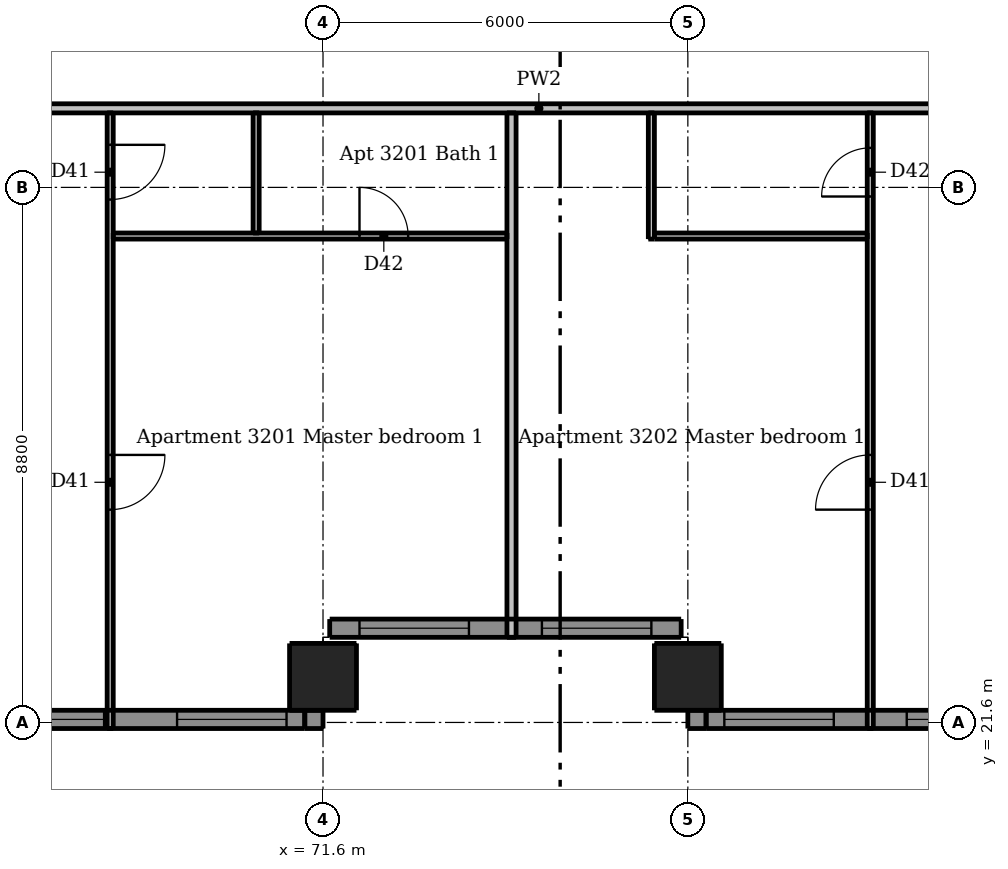
"""IFC4 building model, lengths in metres.
Left out: names, types, materials, properties, quantities, classifications, styles, units other than length and angle.
Written with IfcOpenShell. Run it as: python <this file> out.ifc"""

import sys

from ifc_helpers import new_model, si_unit, direction, frame, frame_2d, origin, origin_2d, place, context, subcontext, project, spatial, rectangle, extrude, element, fill, save


model = new_model("IFC4")
c1 = context("Model", 3, precision=1e-05, world=origin(), true_north=direction((0.0, 1.0)))
c2 = subcontext(c1, "Body", "Model", "MODEL_VIEW")
j1 = project(units=[si_unit("LENGTHUNIT", "METRE"), si_unit("PLANEANGLEUNIT", "RADIAN")], contexts=[c1])
p1 = place(None, origin())
s1 = spatial("IfcSite", under=j1, at=p1, CompositionType="ELEMENT")
p2 = place(p1, origin())
s2 = spatial("IfcBuilding", under=s1, at=p2, CompositionType="ELEMENT")
p3 = place(p2, frame((0.0, 0.0, 118.3)))
s3 = spatial("IfcBuildingStorey", under=s2, at=p3, CompositionType="ELEMENT", Elevation=118.3)
for number, where, z_axis, x_axis in (
    (1, (71.6, 22.35, 0.0), (0.0, 0.0, 1.0), (1.0, 0.0, 0.0)),
    (2, (77.6, 22.35, 0.0), (0.0, 0.0, 1.0), (1.0, 0.0, 0.0)),
):
    element("IfcColumn", number, at=place(p3, frame(where, z_axis=z_axis, x_axis=x_axis)), inside=s3, PredefinedType="COLUMN", context=c2, shape_type="SweptSolid", body=[
        extrude(rectangle(XDim=1.1, YDim=1.1, at=origin_2d()), origin(), (0.0, 0.0, 1.0), 3.05),
    ])
for number, where, z_axis, x_axis in (
    (3, (71.45, 21.5, 0.0), (0.0, 0.0, 1.0), (0.0, 1.0, 0.0)),
    (4, (77.75, 21.8, 0.0), (0.0, 0.0, 1.0), (0.0, -1.0, 0.0)),
):
    element("IfcWall", number, at=place(p3, frame(where, z_axis=z_axis, x_axis=x_axis)), inside=s3, PredefinedType="SOLIDWALL", context=c2, shape_type="SweptSolid", body=[
        extrude(rectangle(XDim=0.3, YDim=0.3, at=frame_2d((0.15, 0.0))), origin(), (0.0, 0.0, 1.0), 3.05),
    ])
p4 = place(p3, frame((65.6, 21.65, 0.0), z_axis=(0.0, 0.0, 1.0), x_axis=(1.0, 0.0, 0.0)))
e5 = element("IfcWall", 5, at=p4, inside=s3, PredefinedType="SOLIDWALL", context=c2, shape_type="SweptSolid", body=[
    extrude(rectangle(XDim=5.7, YDim=0.3, at=frame_2d((2.85, 0.0))), origin(), (0.0, 0.0, 1.0), 3.05),
])
p5 = place(p4, frame((0.6, 0.0, 0.15)))
e6 = element("IfcOpeningElement", 6, at=p5, cuts=e5, PredefinedType="OPENING", context=c2, shape_type="SweptSolid", body=[
    extrude(rectangle(XDim=1.8, YDim=2.1, at=frame_2d((0.9, 1.05))), frame((0.0, 0.16, 0.0), z_axis=(0.0, -1.0, 0.0), x_axis=(1.0, 0.0, 0.0)), (0.0, 0.0, 1.0), 0.32),
])
p6 = place(p4, frame((3.6, 0.0, 0.15)))
e7 = element("IfcOpeningElement", 7, at=p6, cuts=e5, PredefinedType="OPENING", context=c2, shape_type="SweptSolid", body=[
    extrude(rectangle(XDim=1.8, YDim=2.1, at=frame_2d((0.9, 1.05))), frame((0.0, 0.16, 0.0), z_axis=(0.0, -1.0, 0.0), x_axis=(1.0, 0.0, 0.0)), (0.0, 0.0, 1.0), 0.32),
])
p7 = place(p3, frame((71.71, 23.15, 0.0), z_axis=(0.0, 0.0, 1.0), x_axis=(1.0, 0.0, 0.0)))
e8 = element("IfcWall", 8, at=p7, inside=s3, PredefinedType="SOLIDWALL", context=c2, shape_type="SweptSolid", body=[
    extrude(rectangle(XDim=5.78, YDim=0.3, at=frame_2d((2.89, 0.0))), origin(), (0.0, 0.0, 1.0), 3.05),
])
p8 = place(p7, frame((0.49, 0.0, 0.15)))
e9 = element("IfcOpeningElement", 9, at=p8, cuts=e8, PredefinedType="OPENING", context=c2, shape_type="SweptSolid", body=[
    extrude(rectangle(XDim=1.8, YDim=2.1, at=frame_2d((0.9, 1.05))), frame((0.0, 0.16, 0.0), z_axis=(0.0, -1.0, 0.0), x_axis=(1.0, 0.0, 0.0)), (0.0, 0.0, 1.0), 0.32),
])
p9 = place(p7, frame((3.49, 0.0, 0.15)))
e10 = element("IfcOpeningElement", 10, at=p9, cuts=e8, PredefinedType="OPENING", context=c2, shape_type="SweptSolid", body=[
    extrude(rectangle(XDim=1.8, YDim=2.1, at=frame_2d((0.9, 1.05))), frame((0.0, 0.16, 0.0), z_axis=(0.0, -1.0, 0.0), x_axis=(1.0, 0.0, 0.0)), (0.0, 0.0, 1.0), 0.32),
])
p10 = place(p3, frame((77.9, 21.65, 0.0), z_axis=(0.0, 0.0, 1.0), x_axis=(1.0, 0.0, 0.0)))
e11 = element("IfcWall", 11, at=p10, inside=s3, PredefinedType="SOLIDWALL", context=c2, shape_type="SweptSolid", body=[
    extrude(rectangle(XDim=5.4, YDim=0.3, at=frame_2d((2.7, 0.0))), origin(), (0.0, 0.0, 1.0), 3.05),
])
p11 = place(p10, frame((0.3, 0.0, 0.15)))
e12 = element("IfcOpeningElement", 12, at=p11, cuts=e11, PredefinedType="OPENING", context=c2, shape_type="SweptSolid", body=[
    extrude(rectangle(XDim=1.8, YDim=2.1, at=frame_2d((0.9, 1.05))), frame((0.0, 0.16, 0.0), z_axis=(0.0, -1.0, 0.0), x_axis=(1.0, 0.0, 0.0)), (0.0, 0.0, 1.0), 0.32),
])
p12 = place(p10, frame((3.3, 0.0, 0.15)))
e13 = element("IfcOpeningElement", 13, at=p12, cuts=e11, PredefinedType="OPENING", context=c2, shape_type="SweptSolid", body=[
    extrude(rectangle(XDim=1.8, YDim=2.1, at=frame_2d((0.9, 1.05))), frame((0.0, 0.16, 0.0), z_axis=(0.0, -1.0, 0.0), x_axis=(1.0, 0.0, 0.0)), (0.0, 0.0, 1.0), 0.32),
])
p13 = place(p3, frame((68.1, 31.625, 0.0), z_axis=(0.0, 0.0, 1.0), x_axis=(0.0, -1.0, 0.0)))
e14 = element("IfcWall", 14, at=p13, inside=s3, PredefinedType="PARTITIONING", context=c2, shape_type="SweptSolid", body=[
    extrude(rectangle(XDim=10.125, YDim=0.1, at=frame_2d((5.062, 0.0))), origin(), (0.0, 0.0, 1.0), 3.05),
])
p14 = place(p13, frame((0.525, 0.0, 0.0)))
e15 = element("IfcOpeningElement", 15, at=p14, cuts=e14, PredefinedType="OPENING", context=c2, shape_type="SweptSolid", body=[
    extrude(rectangle(XDim=0.9, YDim=2.1, at=frame_2d((0.45, 1.05))), frame((0.0, 0.06, 0.0), z_axis=(0.0, -1.0, 0.0), x_axis=(1.0, 0.0, 0.0)), (0.0, 0.0, 1.0), 0.12),
])
p15 = place(p13, frame((5.625, 0.0, 0.0)))
e16 = element("IfcOpeningElement", 16, at=p15, cuts=e14, PredefinedType="OPENING", context=c2, shape_type="SweptSolid", body=[
    extrude(rectangle(XDim=0.9, YDim=2.1, at=frame_2d((0.45, 1.05))), frame((0.0, 0.06, 0.0), z_axis=(0.0, -1.0, 0.0), x_axis=(1.0, 0.0, 0.0)), (0.0, 0.0, 1.0), 0.12),
])
p16 = place(p3, frame((70.5, 29.65, 0.0), z_axis=(0.0, 0.0, 1.0), x_axis=(0.0, 1.0, 0.0)))
e17 = element("IfcWall", 17, at=p16, inside=s3, PredefinedType="PARTITIONING", context=c2, shape_type="SweptSolid", body=[
    extrude(rectangle(XDim=1.975, YDim=0.1, at=frame_2d((0.988, 0.0))), origin(), (0.0, 0.0, 1.0), 3.05),
])
p17 = place(p3, frame((77.0, 29.55, 0.0), z_axis=(0.0, 0.0, 1.0), x_axis=(0.0, 1.0, 0.0)))
e18 = element("IfcWall", 18, at=p17, inside=s3, PredefinedType="PARTITIONING", context=c2, shape_type="SweptSolid", body=[
    extrude(rectangle(XDim=2.075, YDim=0.1, at=frame_2d((1.038, 0.0))), origin(), (0.0, 0.0, 1.0), 3.05),
])
p18 = place(p3, frame((80.6, 21.5, 0.0), z_axis=(0.0, 0.0, 1.0), x_axis=(0.0, 1.0, 0.0)))
e19 = element("IfcWall", 19, at=p18, inside=s3, PredefinedType="PARTITIONING", context=c2, shape_type="SweptSolid", body=[
    extrude(rectangle(XDim=10.125, YDim=0.1, at=frame_2d((5.062, 0.0))), origin(), (0.0, 0.0, 1.0), 3.05),
])
p19 = place(p18, frame((3.6, 0.0, 0.0)))
e20 = element("IfcOpeningElement", 20, at=p19, cuts=e19, PredefinedType="OPENING", context=c2, shape_type="SweptSolid", body=[
    extrude(rectangle(XDim=0.9, YDim=2.1, at=frame_2d((0.45, 1.05))), frame((0.0, 0.06, 0.0), z_axis=(0.0, -1.0, 0.0), x_axis=(1.0, 0.0, 0.0)), (0.0, 0.0, 1.0), 0.12),
])
p20 = place(p18, frame((8.75, 0.0, 0.0)))
e21 = element("IfcOpeningElement", 21, at=p20, cuts=e19, PredefinedType="OPENING", context=c2, shape_type="SweptSolid", body=[
    extrude(rectangle(XDim=0.8, YDim=2.1, at=frame_2d((0.4, 1.05))), frame((0.0, 0.06, 0.0), z_axis=(0.0, -1.0, 0.0), x_axis=(1.0, 0.0, 0.0)), (0.0, 0.0, 1.0), 0.12),
])
p21 = place(p3, frame((68.15, 29.6, 0.0), z_axis=(0.0, 0.0, 1.0), x_axis=(1.0, 0.0, 0.0)))
e22 = element("IfcWall", 22, at=p21, inside=s3, PredefinedType="PARTITIONING", context=c2, shape_type="SweptSolid", body=[
    extrude(rectangle(XDim=6.475, YDim=0.1, at=frame_2d((3.238, 0.0))), origin(), (0.0, 0.0, 1.0), 3.05),
])
p22 = place(p21, frame((4.05, 0.0, 0.0)))
e23 = element("IfcOpeningElement", 23, at=p22, cuts=e22, PredefinedType="OPENING", context=c2, shape_type="SweptSolid", body=[
    extrude(rectangle(XDim=0.8, YDim=2.1, at=frame_2d((0.4, 1.05))), frame((0.0, 0.06, 0.0), z_axis=(0.0, -1.0, 0.0), x_axis=(1.0, 0.0, 0.0)), (0.0, 0.0, 1.0), 0.12),
])
p23 = place(p3, frame((77.05, 29.6, 0.0), z_axis=(0.0, 0.0, 1.0), x_axis=(1.0, 0.0, 0.0)))
e24 = element("IfcWall", 24, at=p23, inside=s3, PredefinedType="PARTITIONING", context=c2, shape_type="SweptSolid", body=[
    extrude(rectangle(XDim=3.5, YDim=0.1, at=frame_2d((1.75, 0.0))), origin(), (0.0, 0.0, 1.0), 3.05),
])
p24 = place(p3, frame((74.7, 23.0, 0.0), z_axis=(0.0, 0.0, 1.0), x_axis=(0.0, 1.0, 0.0)))
e25 = element("IfcWall", 25, at=p24, inside=s3, PredefinedType="PARTITIONING", context=c2, shape_type="SweptSolid", body=[
    extrude(rectangle(XDim=8.625, YDim=0.15, at=frame_2d((4.312, 0.0))), origin(), (0.0, 0.0, 1.0), 3.05),
])
p25 = place(p3, frame((89.525, 31.7, 0.0), z_axis=(0.0, 0.0, 1.0), x_axis=(-1.0, 0.0, 0.0)))
e26 = element("IfcWall", 26, at=p25, inside=s3, PredefinedType="PARTITIONING", context=c2, shape_type="SweptSolid", body=[
    extrude(rectangle(XDim=28.75, YDim=0.15, at=frame_2d((14.375, 0.0))), origin(), (0.0, 0.0, 1.0), 3.05),
])
p26 = place(p25, frame((24.625, 0.0, 0.0)))
e27 = element("IfcOpeningElement", 27, at=p26, cuts=e26, PredefinedType="OPENING", context=c2, shape_type="SweptSolid", body=[
    extrude(rectangle(XDim=1.0, YDim=2.1, at=frame_2d((0.5, 1.05))), frame((0.0, 0.085, 0.0), z_axis=(0.0, -1.0, 0.0), x_axis=(1.0, 0.0, 0.0)), (0.0, 0.0, 1.0), 0.17),
])
p27 = place(p25, frame((5.425, 0.0, 0.0)))
e28 = element("IfcOpeningElement", 28, at=p27, cuts=e26, PredefinedType="OPENING", context=c2, shape_type="SweptSolid", body=[
    extrude(rectangle(XDim=1.0, YDim=2.1, at=frame_2d((0.5, 1.05))), frame((0.0, 0.085, 0.0), z_axis=(0.0, -1.0, 0.0), x_axis=(1.0, 0.0, 0.0)), (0.0, 0.0, 1.0), 0.17),
])
p28 = place(p5, origin())
e29 = element("IfcWindow", 29, at=p28, inside=s3, PartitioningType="DOUBLE_PANEL_VERTICAL", PredefinedType="WINDOW", context=c2, shape_type="SweptSolid", body=[
    extrude(rectangle(XDim=1.8, YDim=2.1, at=frame_2d((0.9, 1.05))), frame((0.0, 0.03, 0.0), z_axis=(0.0, -1.0, 0.0), x_axis=(1.0, 0.0, 0.0)), (0.0, 0.0, 1.0), 0.06),
])
fill(e6, e29)
p29 = place(p6, origin())
e30 = element("IfcWindow", 30, at=p29, inside=s3, PartitioningType="DOUBLE_PANEL_VERTICAL", PredefinedType="WINDOW", context=c2, shape_type="SweptSolid", body=[
    extrude(rectangle(XDim=1.8, YDim=2.1, at=frame_2d((0.9, 1.05))), frame((0.0, 0.03, 0.0), z_axis=(0.0, -1.0, 0.0), x_axis=(1.0, 0.0, 0.0)), (0.0, 0.0, 1.0), 0.06),
])
fill(e7, e30)
p30 = place(p8, origin())
e31 = element("IfcWindow", 31, at=p30, inside=s3, PartitioningType="DOUBLE_PANEL_VERTICAL", PredefinedType="WINDOW", context=c2, shape_type="SweptSolid", body=[
    extrude(rectangle(XDim=1.8, YDim=2.1, at=frame_2d((0.9, 1.05))), frame((0.0, 0.03, 0.0), z_axis=(0.0, -1.0, 0.0), x_axis=(1.0, 0.0, 0.0)), (0.0, 0.0, 1.0), 0.06),
])
fill(e9, e31)
p31 = place(p9, origin())
e32 = element("IfcWindow", 32, at=p31, inside=s3, PartitioningType="DOUBLE_PANEL_VERTICAL", PredefinedType="WINDOW", context=c2, shape_type="SweptSolid", body=[
    extrude(rectangle(XDim=1.8, YDim=2.1, at=frame_2d((0.9, 1.05))), frame((0.0, 0.03, 0.0), z_axis=(0.0, -1.0, 0.0), x_axis=(1.0, 0.0, 0.0)), (0.0, 0.0, 1.0), 0.06),
])
fill(e10, e32)
p32 = place(p11, origin())
e33 = element("IfcWindow", 33, at=p32, inside=s3, PartitioningType="DOUBLE_PANEL_VERTICAL", PredefinedType="WINDOW", context=c2, shape_type="SweptSolid", body=[
    extrude(rectangle(XDim=1.8, YDim=2.1, at=frame_2d((0.9, 1.05))), frame((0.0, 0.03, 0.0), z_axis=(0.0, -1.0, 0.0), x_axis=(1.0, 0.0, 0.0)), (0.0, 0.0, 1.0), 0.06),
])
fill(e12, e33)
p33 = place(p12, origin())
e34 = element("IfcWindow", 34, at=p33, inside=s3, PartitioningType="DOUBLE_PANEL_VERTICAL", PredefinedType="WINDOW", context=c2, shape_type="SweptSolid", body=[
    extrude(rectangle(XDim=1.8, YDim=2.1, at=frame_2d((0.9, 1.05))), frame((0.0, 0.03, 0.0), z_axis=(0.0, -1.0, 0.0), x_axis=(1.0, 0.0, 0.0)), (0.0, 0.0, 1.0), 0.06),
])
fill(e13, e34)
p34 = place(p14, origin())
e35 = element("IfcDoor", 35, at=p34, inside=s3, OperationType="SINGLE_SWING_LEFT", PredefinedType="DOOR", context=c2, shape_type="SweptSolid", body=[
    extrude(rectangle(XDim=0.9, YDim=2.1, at=frame_2d((0.45, 1.05))), frame((0.0, 0.025, 0.0), z_axis=(0.0, -1.0, 0.0), x_axis=(1.0, 0.0, 0.0)), (0.0, 0.0, 1.0), 0.05),
])
fill(e15, e35)
p35 = place(p15, origin())
e36 = element("IfcDoor", 36, at=p35, inside=s3, OperationType="SINGLE_SWING_LEFT", PredefinedType="DOOR", context=c2, shape_type="SweptSolid", body=[
    extrude(rectangle(XDim=0.9, YDim=2.1, at=frame_2d((0.45, 1.05))), frame((0.0, 0.025, 0.0), z_axis=(0.0, -1.0, 0.0), x_axis=(1.0, 0.0, 0.0)), (0.0, 0.0, 1.0), 0.05),
])
fill(e16, e36)
p36 = place(p22, origin())
e37 = element("IfcDoor", 37, at=p36, inside=s3, OperationType="SINGLE_SWING_LEFT", PredefinedType="DOOR", context=c2, shape_type="SweptSolid", body=[
    extrude(rectangle(XDim=0.8, YDim=2.1, at=frame_2d((0.4, 1.05))), frame((0.0, 0.025, 0.0), z_axis=(0.0, -1.0, 0.0), x_axis=(1.0, 0.0, 0.0)), (0.0, 0.0, 1.0), 0.05),
])
fill(e23, e37)
p37 = place(p19, origin())
e38 = element("IfcDoor", 38, at=p37, inside=s3, OperationType="SINGLE_SWING_LEFT", PredefinedType="DOOR", context=c2, shape_type="SweptSolid", body=[
    extrude(rectangle(XDim=0.9, YDim=2.1, at=frame_2d((0.45, 1.05))), frame((0.0, 0.025, 0.0), z_axis=(0.0, -1.0, 0.0), x_axis=(1.0, 0.0, 0.0)), (0.0, 0.0, 1.0), 0.05),
])
fill(e20, e38)
p38 = place(p20, origin())
e39 = element("IfcDoor", 39, at=p38, inside=s3, OperationType="SINGLE_SWING_LEFT", PredefinedType="DOOR", context=c2, shape_type="SweptSolid", body=[
    extrude(rectangle(XDim=0.8, YDim=2.1, at=frame_2d((0.4, 1.05))), frame((0.0, 0.025, 0.0), z_axis=(0.0, -1.0, 0.0), x_axis=(1.0, 0.0, 0.0)), (0.0, 0.0, 1.0), 0.05),
])
fill(e21, e39)
save(model, sys.argv[1])
